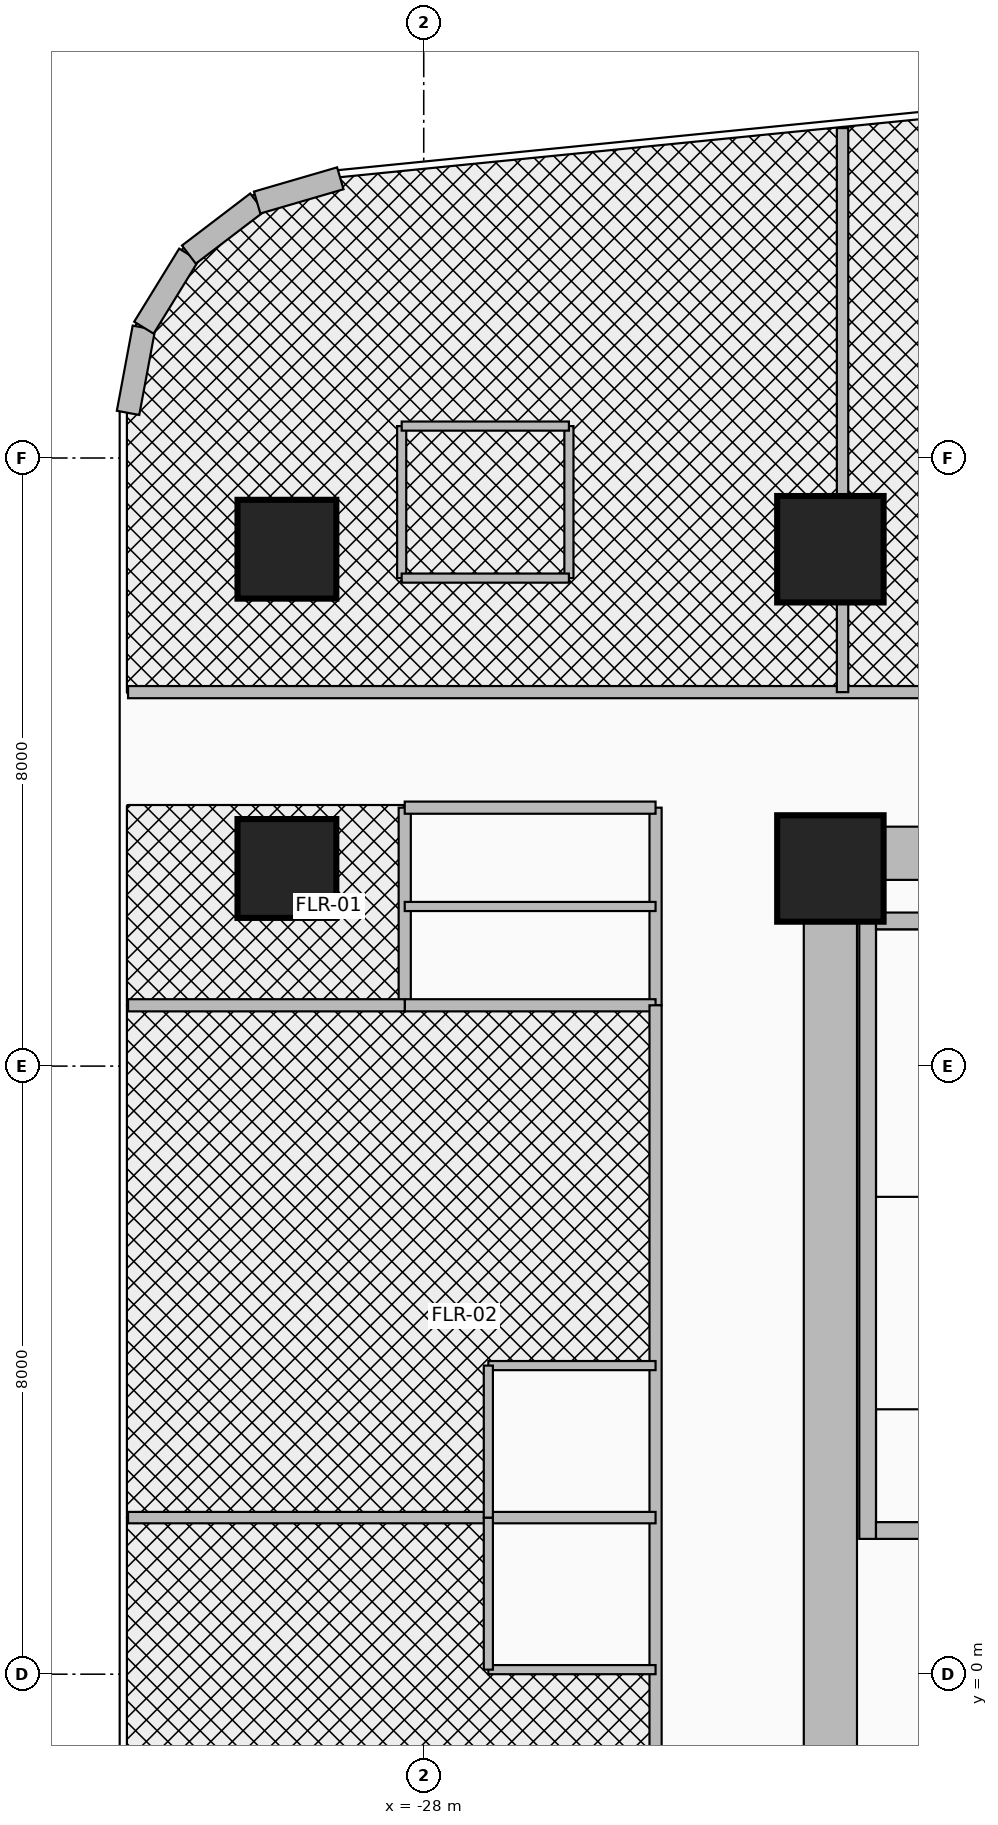
"""IFC4 building model, lengths in metres.
Left out: names, types, materials, properties, quantities, classifications, styles, units other than length and angle.
Written with IfcOpenShell. Run it as: python <this file> out.ifc"""

import sys

from ifc_helpers import new_model, si_unit, direction, frame, frame_2d, origin, origin_2d, place, context, subcontext, project, spatial, rectangle, circle, extrude, source, transform, mapped, element, fill, save


model = new_model("IFC4")
c1 = context("Model", 3, precision=1e-05, world=origin(), true_north=direction((0.0, 1.0)))
c2 = subcontext(c1, "Body", "Model", "MODEL_VIEW")
j1 = project(units=[si_unit("LENGTHUNIT", "METRE"), si_unit("PLANEANGLEUNIT", "RADIAN")], contexts=[c1])
p1 = place(None, origin())
s1 = spatial("IfcSite", under=j1, at=p1, CompositionType="ELEMENT")
p2 = place(p1, origin())
s2 = spatial("IfcBuilding", under=s1, at=p2, CompositionType="ELEMENT")
p3 = place(p2, frame((0.0, 0.0, 26.0)))
s3 = spatial("IfcBuildingStorey", under=s2, at=p3, CompositionType="ELEMENT", Elevation=26.0)
p4 = place(p3, frame((-22.16, 1.78, 0.0), z_axis=(0.0, 0.0, 1.0), x_axis=(0.0, 1.0, 0.0)))
e1 = element("IfcWall", 1, at=p4, inside=s3, PredefinedType="SHEAR", context=c2, shape_type="SweptSolid", body=[
    extrude(rectangle(XDim=8.67, YDim=0.22, at=frame_2d((4.335, 0.0))), origin(), (0.0, 0.0, 1.0), 3.46),
])
p5 = place(p3, frame((-22.05, 1.89, 0.0), z_axis=(0.0, 0.0, 1.0), x_axis=(1.0, 0.0, 0.0)))
e2 = element("IfcWall", 2, at=p5, inside=s3, PredefinedType="SHEAR", context=c2, shape_type="SweptSolid", body=[
    extrude(rectangle(XDim=3.11, YDim=0.22, at=frame_2d((1.555, 0.0))), origin(), (0.0, 0.0, 1.0), 3.46),
])
p6 = place(p5, frame((1.0, 0.0, 0.0)))
e3 = element("IfcOpeningElement", 3, at=p6, cuts=e2, PredefinedType="OPENING", context=c2, shape_type="SweptSolid", body=[
    extrude(rectangle(XDim=1.1, YDim=2.15, at=frame_2d((0.55, 1.075))), frame((0.0, 0.125, 0.0), z_axis=(0.0, -1.0, 0.0), x_axis=(1.0, 0.0, 0.0)), (0.0, 0.0, 1.0), 0.25),
])
p7 = place(p3, frame((-22.05, 9.91, 0.0), z_axis=(0.0, 0.0, 1.0), x_axis=(1.0, 0.0, 0.0)))
e4 = element("IfcWall", 4, at=p7, inside=s3, PredefinedType="SHEAR", context=c2, shape_type="SweptSolid", body=[
    extrude(rectangle(XDim=3.11, YDim=0.22, at=frame_2d((1.555, 0.0))), origin(), (0.0, 0.0, 1.0), 3.46),
])
p8 = place(p3, frame((-22.65, -11.15, 0.0), z_axis=(0.0, 0.0, 1.0), x_axis=(0.0, 1.0, 0.0)))
e5 = element("IfcWall", 5, at=p8, inside=s3, PredefinedType="SHEAR", context=c2, shape_type="SweptSolid", body=[
    extrude(rectangle(XDim=22.3, YDim=0.7, at=frame_2d((11.15, 0.0))), origin(), (0.0, 0.0, 1.0), 3.46),
])
p9 = place(p3, frame((-22.65, 10.8, 0.0), z_axis=(0.0, 0.0, 1.0), x_axis=(1.0, 0.0, 0.0)))
e6 = element("IfcWall", 6, at=p9, inside=s3, PredefinedType="SHEAR", context=c2, shape_type="SweptSolid", body=[
    extrude(rectangle(XDim=10.25, YDim=0.7, at=frame_2d((5.125, 0.0))), origin(), (0.0, 0.0, 1.0), 3.46),
])
m1 = source(origin(), c2, "Body", "SweptSolid", [
    extrude(circle(Radius=0.65, at=origin_2d()), origin(), (0.0, 0.0, 1.0), 3.7),
])
p10 = place(p3, frame((-29.8, 10.6, 0.0), z_axis=(0.0, 0.0, 1.0), x_axis=(1.0, 0.0, 0.0)))
e7 = element("IfcColumn", 7, at=p10, inside=s3, PredefinedType="COLUMN", context=c2, shape_type="MappedRepresentation", body=[
    mapped(m1, transform((0.0, 0.0, 0.0), x_axis=(1.0, 0.0, 0.0), y_axis=(0.0, 1.0, 0.0), z_axis=(0.0, 0.0, 1.0), scale=1.0)),
])
m2 = source(origin(), c2, "Body", "SweptSolid", [
    extrude(rectangle(XDim=1.4, YDim=1.4, at=origin_2d()), origin(), (0.0, 0.0, 1.0), 3.7),
])
p11 = place(p3, frame((-22.65, 10.6, 0.0), z_axis=(0.0, 0.0, 1.0), x_axis=(1.0, 0.0, 0.0)))
e8 = element("IfcColumn", 8, at=p11, inside=s3, PredefinedType="COLUMN", context=c2, shape_type="MappedRepresentation", body=[
    mapped(m2, transform((0.0, 0.0, 0.0), x_axis=(1.0, 0.0, 0.0), y_axis=(0.0, 1.0, 0.0), z_axis=(0.0, 0.0, 1.0), scale=1.0)),
])
p12 = place(p3, frame((-29.8, 14.8, 0.0), z_axis=(0.0, 0.0, 1.0), x_axis=(1.0, 0.0, 0.0)))
e9 = element("IfcColumn", 9, at=p12, inside=s3, PredefinedType="COLUMN", context=c2, shape_type="MappedRepresentation", body=[
    mapped(m1, transform((0.0, 0.0, 0.0), x_axis=(1.0, 0.0, 0.0), y_axis=(0.0, 1.0, 0.0), z_axis=(0.0, 0.0, 1.0), scale=1.0)),
])
p13 = place(p3, frame((-22.65, 14.8, 0.0), z_axis=(0.0, 0.0, 1.0), x_axis=(1.0, 0.0, 0.0)))
e10 = element("IfcColumn", 10, at=p13, inside=s3, PredefinedType="COLUMN", context=c2, shape_type="MappedRepresentation", body=[
    mapped(m2, transform((0.0, 0.0, 0.0), x_axis=(1.0, 0.0, 0.0), y_axis=(0.0, 1.0, 0.0), z_axis=(0.0, 0.0, 1.0), scale=1.0)),
])
p14 = place(p3, frame((-31.89, 16.594, 0.0), z_axis=(0.0, 0.0, 1.0), x_axis=(0.182748995683, 0.9831596028, 0.0)))
e11 = element("IfcWall", 11, at=p14, inside=s3, PredefinedType="SOLIDWALL", context=c2, shape_type="SweptSolid", body=[
    extrude(rectangle(XDim=1.14, YDim=0.3, at=frame_2d((0.57, 0.0))), origin(), (0.0, 0.0, 1.0), 3.46),
])
p15 = place(p3, frame((-31.682, 17.714, 0.0), z_axis=(0.0, 0.0, 1.0), x_axis=(0.524157723014, 0.8516212077, 0.0)))
e12 = element("IfcWall", 12, at=p15, inside=s3, PredefinedType="SOLIDWALL", context=c2, shape_type="SweptSolid", body=[
    extrude(rectangle(XDim=1.129, YDim=0.3, at=frame_2d((0.565, 0.0))), origin(), (0.0, 0.0, 1.0), 3.46),
])
p16 = place(p3, frame((-31.09, 18.676, 0.0), z_axis=(0.0, 0.0, 1.0), x_axis=(0.795253002434, 0.606277710393, 0.0)))
e13 = element("IfcWall", 13, at=p16, inside=s3, PredefinedType="SOLIDWALL", context=c2, shape_type="SweptSolid", body=[
    extrude(rectangle(XDim=1.129, YDim=0.3, at=frame_2d((0.564, 0.0))), origin(), (0.0, 0.0, 1.0), 3.46),
])
p17 = place(p3, frame((-30.192, 19.361, 0.0), z_axis=(0.0, 0.0, 1.0), x_axis=(0.960071941549, 0.279753225271, 0.0)))
e14 = element("IfcWall", 14, at=p17, inside=s3, PredefinedType="SOLIDWALL", context=c2, shape_type="SweptSolid", body=[
    extrude(rectangle(XDim=1.14, YDim=0.3, at=frame_2d((0.57, 0.0))), origin(), (0.0, 0.0, 1.0), 3.46),
])
p18 = place(p3, frame((-28.25, 8.8, 0.0), z_axis=(0.0, 0.0, 1.0), x_axis=(0.0, 1.0, 0.0)))
e15 = element("IfcWall", 15, at=p18, inside=s3, PredefinedType="PARTITIONING", context=c2, shape_type="SweptSolid", body=[
    extrude(rectangle(XDim=2.6, YDim=0.16, at=frame_2d((1.3, 0.0))), origin(), (0.0, 0.0, 1.0), 2.583),
])
p19 = place(p3, frame((-24.95, 8.8, 0.0), z_axis=(0.0, 0.0, 1.0), x_axis=(0.0, 1.0, 0.0)))
e16 = element("IfcWall", 16, at=p19, inside=s3, PredefinedType="PARTITIONING", context=c2, shape_type="SweptSolid", body=[
    extrude(rectangle(XDim=2.6, YDim=0.16, at=frame_2d((1.3, 0.0))), origin(), (0.0, 0.0, 1.0), 2.583),
])
p20 = place(p19, frame((0.3, 0.0, 0.0)))
e17 = element("IfcOpeningElement", 17, at=p20, cuts=e16, PredefinedType="OPENING", context=c2, shape_type="SweptSolid", body=[
    extrude(rectangle(XDim=0.85, YDim=2.1, at=frame_2d((0.425, 1.05))), frame((0.0, 0.095, 0.0), z_axis=(0.0, -1.0, 0.0), x_axis=(1.0, 0.0, 0.0)), (0.0, 0.0, 1.0), 0.19),
])
p21 = place(p19, frame((1.45, 0.0, 0.0)))
e18 = element("IfcOpeningElement", 18, at=p21, cuts=e16, PredefinedType="OPENING", context=c2, shape_type="SweptSolid", body=[
    extrude(rectangle(XDim=0.85, YDim=2.1, at=frame_2d((0.425, 1.05))), frame((0.0, 0.095, 0.0), z_axis=(0.0, -1.0, 0.0), x_axis=(1.0, 0.0, 0.0)), (0.0, 0.0, 1.0), 0.19),
])
for number, where, z_axis, x_axis in (
    (19, (-28.25, 8.8, 0.0), (0.0, 0.0, 1.0), (1.0, 0.0, 0.0)),
    (20, (-28.25, 11.4, 0.0), (0.0, 0.0, 1.0), (1.0, 0.0, 0.0)),
):
    element("IfcWall", number, at=place(p3, frame(where, z_axis=z_axis, x_axis=x_axis)), inside=s3, PredefinedType="PARTITIONING", context=c2, shape_type="SweptSolid", body=[
        extrude(rectangle(XDim=3.3, YDim=0.16, at=frame_2d((1.65, 0.0))), origin(), (0.0, 0.0, 1.0), 3.46),
    ])
p22 = place(p3, frame((-28.25, 10.1, 0.0), z_axis=(0.0, 0.0, 1.0), x_axis=(1.0, 0.0, 0.0)))
e21 = element("IfcWall", 21, at=p22, inside=s3, PredefinedType="PARTITIONING", context=c2, shape_type="SweptSolid", body=[
    extrude(rectangle(XDim=3.3, YDim=0.12, at=frame_2d((1.65, 0.0))), origin(), (0.0, 0.0, 1.0), 3.46),
])
p23 = place(p3, frame((-24.95, -11.42, 0.0), z_axis=(0.0, 0.0, 1.0), x_axis=(0.0, 1.0, 0.0)))
e22 = element("IfcWall", 22, at=p23, inside=s3, PredefinedType="PARTITIONING", context=c2, shape_type="SweptSolid", body=[
    extrude(rectangle(XDim=20.22, YDim=0.16, at=frame_2d((10.11, 0.0))), origin(), (0.0, 0.0, 1.0), 2.583),
])
p24 = place(p23, frame((1.895, 0.0, 0.0)))
e23 = element("IfcOpeningElement", 23, at=p24, cuts=e22, PredefinedType="OPENING", context=c2, shape_type="SweptSolid", body=[
    extrude(rectangle(XDim=0.95, YDim=2.15, at=frame_2d((0.475, 1.075))), frame((0.0, 0.095, 0.0), z_axis=(0.0, -1.0, 0.0), x_axis=(1.0, 0.0, 0.0)), (0.0, 0.0, 1.0), 0.19),
])
p25 = place(p23, frame((8.635, 0.0, 0.0)))
e24 = element("IfcOpeningElement", 24, at=p25, cuts=e22, PredefinedType="OPENING", context=c2, shape_type="SweptSolid", body=[
    extrude(rectangle(XDim=0.95, YDim=2.15, at=frame_2d((0.475, 1.075))), frame((0.0, 0.095, 0.0), z_axis=(0.0, -1.0, 0.0), x_axis=(1.0, 0.0, 0.0)), (0.0, 0.0, 1.0), 0.19),
])
p26 = place(p23, frame((17.375, 0.0, 0.0)))
e25 = element("IfcOpeningElement", 25, at=p26, cuts=e22, PredefinedType="OPENING", context=c2, shape_type="SweptSolid", body=[
    extrude(rectangle(XDim=0.95, YDim=2.15, at=frame_2d((0.475, 1.075))), frame((0.0, 0.095, 0.0), z_axis=(0.0, -1.0, 0.0), x_axis=(1.0, 0.0, 0.0)), (0.0, 0.0, 1.0), 0.19),
])
p27 = place(p3, frame((-31.89, 8.8, 0.0), z_axis=(0.0, 0.0, 1.0), x_axis=(1.0, 0.0, 0.0)))
e26 = element("IfcWall", 26, at=p27, inside=s3, PredefinedType="PARTITIONING", context=c2, shape_type="SweptSolid", body=[
    extrude(rectangle(XDim=3.64, YDim=0.16, at=frame_2d((1.82, 0.0))), origin(), (0.0, 0.0, 1.0), 2.896),
])
p28 = place(p27, frame((0.32, 0.0, 0.0)))
e27 = element("IfcOpeningElement", 27, at=p28, cuts=e26, PredefinedType="OPENING", context=c2, shape_type="SweptSolid", body=[
    extrude(rectangle(XDim=0.9, YDim=2.1, at=frame_2d((0.45, 1.05))), frame((0.0, 0.095, 0.0), z_axis=(0.0, -1.0, 0.0), x_axis=(1.0, 0.0, 0.0)), (0.0, 0.0, 1.0), 0.19),
])
p29 = place(p3, frame((-31.89, 2.06, 0.0), z_axis=(0.0, 0.0, 1.0), x_axis=(1.0, 0.0, 0.0)))
e28 = element("IfcWall", 28, at=p29, inside=s3, PredefinedType="PARTITIONING", context=c2, shape_type="SweptSolid", body=[
    extrude(rectangle(XDim=6.94, YDim=0.15, at=frame_2d((3.47, 0.0))), origin(), (0.0, 0.0, 1.0), 2.896),
])
p30 = place(p3, frame((-27.15, 0.06, 0.0), z_axis=(0.0, 0.0, 1.0), x_axis=(1.0, 0.0, 0.0)))
e29 = element("IfcWall", 29, at=p30, inside=s3, PredefinedType="PARTITIONING", context=c2, shape_type="SweptSolid", body=[
    extrude(rectangle(XDim=2.2, YDim=0.12, at=frame_2d((1.1, 0.0))), origin(), (0.0, 0.0, 1.0), 2.979),
])
p31 = place(p3, frame((-27.15, 0.06, 0.0), z_axis=(0.0, 0.0, 1.0), x_axis=(0.0, 1.0, 0.0)))
e30 = element("IfcWall", 30, at=p31, inside=s3, PredefinedType="PARTITIONING", context=c2, shape_type="SweptSolid", body=[
    extrude(rectangle(XDim=2.0, YDim=0.12, at=frame_2d((1.0, 0.0))), origin(), (0.0, 0.0, 1.0), 2.979),
])
p32 = place(p31, frame((0.575, 0.0, 0.0)))
e31 = element("IfcOpeningElement", 31, at=p32, cuts=e30, PredefinedType="OPENING", context=c2, shape_type="SweptSolid", body=[
    extrude(rectangle(XDim=0.85, YDim=2.1, at=frame_2d((0.425, 1.05))), frame((0.0, 0.075, 0.0), z_axis=(0.0, -1.0, 0.0), x_axis=(1.0, 0.0, 0.0)), (0.0, 0.0, 1.0), 0.15),
])
p33 = place(p3, frame((-27.15, 4.06, 0.0), z_axis=(0.0, 0.0, 1.0), x_axis=(1.0, 0.0, 0.0)))
e32 = element("IfcWall", 32, at=p33, inside=s3, PredefinedType="PARTITIONING", context=c2, shape_type="SweptSolid", body=[
    extrude(rectangle(XDim=2.2, YDim=0.12, at=frame_2d((1.1, 0.0))), origin(), (0.0, 0.0, 1.0), 3.46),
])
p34 = place(p3, frame((-27.15, 2.06, 0.0), z_axis=(0.0, 0.0, 1.0), x_axis=(0.0, 1.0, 0.0)))
e33 = element("IfcWall", 33, at=p34, inside=s3, PredefinedType="PARTITIONING", context=c2, shape_type="SweptSolid", body=[
    extrude(rectangle(XDim=2.0, YDim=0.12, at=frame_2d((1.0, 0.0))), origin(), (0.0, 0.0, 1.0), 2.979),
])
p35 = place(p34, frame((0.575, 0.0, 0.0)))
e34 = element("IfcOpeningElement", 34, at=p35, cuts=e33, PredefinedType="OPENING", context=c2, shape_type="SweptSolid", body=[
    extrude(rectangle(XDim=0.85, YDim=2.1, at=frame_2d((0.425, 1.05))), frame((0.0, 0.075, 0.0), z_axis=(0.0, -1.0, 0.0), x_axis=(1.0, 0.0, 0.0)), (0.0, 0.0, 1.0), 0.15),
])
p36 = place(p3, frame((-31.89, 12.92, 0.0), z_axis=(0.0, 0.0, 1.0), x_axis=(1.0, 0.0, 0.0)))
e35 = element("IfcWall", 35, at=p36, inside=s3, PredefinedType="PARTITIONING", context=c2, shape_type="SweptSolid", body=[
    extrude(rectangle(XDim=45.44, YDim=0.16, at=frame_2d((22.72, 0.0))), origin(), (0.0, 0.0, 1.0), 2.583),
])
p37 = place(p36, frame((4.225, 0.0, 0.0)))
e36 = element("IfcOpeningElement", 36, at=p37, cuts=e35, PredefinedType="OPENING", context=c2, shape_type="SweptSolid", body=[
    extrude(rectangle(XDim=0.95, YDim=2.15, at=frame_2d((0.475, 1.075))), frame((0.0, 0.095, 0.0), z_axis=(0.0, -1.0, 0.0), x_axis=(1.0, 0.0, 0.0)), (0.0, 0.0, 1.0), 0.19),
])
p38 = place(p36, frame((13.43, 0.0, 0.0)))
e37 = element("IfcOpeningElement", 37, at=p38, cuts=e35, PredefinedType="OPENING", context=c2, shape_type="SweptSolid", body=[
    extrude(rectangle(XDim=0.95, YDim=2.15, at=frame_2d((0.475, 1.075))), frame((0.0, 0.095, 0.0), z_axis=(0.0, -1.0, 0.0), x_axis=(1.0, 0.0, 0.0)), (0.0, 0.0, 1.0), 0.19),
])
p39 = place(p36, frame((20.31, 0.0, 0.0)))
e38 = element("IfcOpeningElement", 38, at=p39, cuts=e35, PredefinedType="OPENING", context=c2, shape_type="SweptSolid", body=[
    extrude(rectangle(XDim=0.95, YDim=2.15, at=frame_2d((0.475, 1.075))), frame((0.0, 0.095, 0.0), z_axis=(0.0, -1.0, 0.0), x_axis=(1.0, 0.0, 0.0)), (0.0, 0.0, 1.0), 0.19),
])
p40 = place(p36, frame((25.517, 0.0, 0.0)))
e39 = element("IfcOpeningElement", 39, at=p40, cuts=e35, PredefinedType="OPENING", context=c2, shape_type="SweptSolid", body=[
    extrude(rectangle(XDim=0.95, YDim=2.15, at=frame_2d((0.475, 1.075))), frame((0.0, 0.095, 0.0), z_axis=(0.0, -1.0, 0.0), x_axis=(1.0, 0.0, 0.0)), (0.0, 0.0, 1.0), 0.19),
])
p41 = place(p36, frame((28.373, 0.0, 0.0)))
e40 = element("IfcOpeningElement", 40, at=p41, cuts=e35, PredefinedType="OPENING", context=c2, shape_type="SweptSolid", body=[
    extrude(rectangle(XDim=0.95, YDim=2.15, at=frame_2d((0.475, 1.075))), frame((0.0, 0.095, 0.0), z_axis=(0.0, -1.0, 0.0), x_axis=(1.0, 0.0, 0.0)), (0.0, 0.0, 1.0), 0.19),
])
p42 = place(p36, frame((34.527, 0.0, 0.0)))
e41 = element("IfcOpeningElement", 41, at=p42, cuts=e35, PredefinedType="OPENING", context=c2, shape_type="SweptSolid", body=[
    extrude(rectangle(XDim=0.95, YDim=2.15, at=frame_2d((0.475, 1.075))), frame((0.0, 0.095, 0.0), z_axis=(0.0, -1.0, 0.0), x_axis=(1.0, 0.0, 0.0)), (0.0, 0.0, 1.0), 0.19),
])
p43 = place(p36, frame((39.36, 0.0, 0.0)))
e42 = element("IfcOpeningElement", 42, at=p43, cuts=e35, PredefinedType="OPENING", context=c2, shape_type="SweptSolid", body=[
    extrude(rectangle(XDim=0.95, YDim=2.15, at=frame_2d((0.475, 1.075))), frame((0.0, 0.095, 0.0), z_axis=(0.0, -1.0, 0.0), x_axis=(1.0, 0.0, 0.0)), (0.0, 0.0, 1.0), 0.19),
])
p44 = place(p3, frame((-22.49, 12.92, 0.0), z_axis=(0.0, 0.0, 1.0), x_axis=(0.0, 1.0, 0.0)))
e43 = element("IfcWall", 43, at=p44, inside=s3, PredefinedType="PARTITIONING", context=c2, shape_type="SweptSolid", body=[
    extrude(rectangle(XDim=7.421, YDim=0.15, at=frame_2d((3.71, 0.0))), origin(), (0.0, 0.0, 1.0), 2.583),
])
for number, where, z_axis, x_axis in (
    (44, (-28.29, 14.42, 0.0), (0.0, 0.0, 1.0), (0.0, 1.0, 0.0)),
    (45, (-26.09, 14.42, 0.0), (0.0, 0.0, 1.0), (0.0, 1.0, 0.0)),
):
    element("IfcWall", number, at=place(p3, frame(where, z_axis=z_axis, x_axis=x_axis)), inside=s3, PredefinedType="PARTITIONING", context=c2, shape_type="SweptSolid", body=[
        extrude(rectangle(XDim=2.0, YDim=0.12, at=frame_2d((1.0, 0.0))), origin(), (0.0, 0.0, 1.0), 2.583),
    ])
p45 = place(p3, frame((-28.29, 16.42, 0.0), z_axis=(0.0, 0.0, 1.0), x_axis=(1.0, 0.0, 0.0)))
e46 = element("IfcWall", 46, at=p45, inside=s3, PredefinedType="PARTITIONING", context=c2, shape_type="SweptSolid", body=[
    extrude(rectangle(XDim=2.2, YDim=0.12, at=frame_2d((1.1, 0.0))), origin(), (0.0, 0.0, 1.0), 3.46),
])
p46 = place(p3, frame((-28.29, 14.42, 0.0), z_axis=(0.0, 0.0, 1.0), x_axis=(1.0, 0.0, 0.0)))
e47 = element("IfcWall", 47, at=p46, inside=s3, PredefinedType="PARTITIONING", context=c2, shape_type="SweptSolid", body=[
    extrude(rectangle(XDim=2.2, YDim=0.12, at=frame_2d((1.1, 0.0))), origin(), (0.0, 0.0, 1.0), 3.46),
])
p47 = place(p46, frame((0.675, 0.0, 0.0)))
e48 = element("IfcOpeningElement", 48, at=p47, cuts=e47, PredefinedType="OPENING", context=c2, shape_type="SweptSolid", body=[
    extrude(rectangle(XDim=0.85, YDim=2.1, at=frame_2d((0.425, 1.05))), frame((0.0, 0.075, 0.0), z_axis=(0.0, -1.0, 0.0), x_axis=(1.0, 0.0, 0.0)), (0.0, 0.0, 1.0), 0.15),
])
p48 = place(p20, origin())
e49 = element("IfcDoor", 49, at=p48, inside=s3, OperationType="SINGLE_SWING_RIGHT", PredefinedType="DOOR", context=c2, shape_type="SweptSolid", body=[
    extrude(rectangle(XDim=0.85, YDim=2.1, at=frame_2d((0.425, 1.05))), frame((0.0, 0.025, 0.0), z_axis=(0.0, -1.0, 0.0), x_axis=(1.0, 0.0, 0.0)), (0.0, 0.0, 1.0), 0.05),
])
fill(e17, e49)
p49 = place(p21, origin())
e50 = element("IfcDoor", 50, at=p49, inside=s3, OperationType="SINGLE_SWING_LEFT", PredefinedType="DOOR", context=c2, shape_type="SweptSolid", body=[
    extrude(rectangle(XDim=0.85, YDim=2.1, at=frame_2d((0.425, 1.05))), frame((0.0, 0.025, 0.0), z_axis=(0.0, -1.0, 0.0), x_axis=(1.0, 0.0, 0.0)), (0.0, 0.0, 1.0), 0.05),
])
fill(e18, e50)
p50 = place(p28, origin())
e51 = element("IfcDoor", 51, at=p50, inside=s3, OperationType="SINGLE_SWING_RIGHT", PredefinedType="DOOR", context=c2, shape_type="SweptSolid", body=[
    extrude(rectangle(XDim=0.9, YDim=2.1, at=frame_2d((0.45, 1.05))), frame((0.0, 0.025, 0.0), z_axis=(0.0, -1.0, 0.0), x_axis=(1.0, 0.0, 0.0)), (0.0, 0.0, 1.0), 0.05),
])
fill(e27, e51)
p51 = place(p32, origin())
e52 = element("IfcDoor", 52, at=p51, inside=s3, OperationType="SINGLE_SWING_RIGHT", PredefinedType="DOOR", context=c2, shape_type="SweptSolid", body=[
    extrude(rectangle(XDim=0.85, YDim=2.1, at=frame_2d((0.425, 1.05))), frame((0.0, 0.025, 0.0), z_axis=(0.0, -1.0, 0.0), x_axis=(1.0, 0.0, 0.0)), (0.0, 0.0, 1.0), 0.05),
])
fill(e31, e52)
p52 = place(p26, frame((0.95, 0.0, 0.0), z_axis=(0.0, 0.0, 1.0), x_axis=(-1.0, 0.0, 0.0)))
e53 = element("IfcDoor", 53, at=p52, inside=s3, OperationType="SINGLE_SWING_LEFT", PredefinedType="DOOR", context=c2, shape_type="SweptSolid", body=[
    extrude(rectangle(XDim=0.95, YDim=2.15, at=frame_2d((0.475, 1.075))), frame((0.0, 0.025, 0.0), z_axis=(0.0, -1.0, 0.0), x_axis=(1.0, 0.0, 0.0)), (0.0, 0.0, 1.0), 0.05),
])
fill(e25, e53)
p53 = place(p35, origin())
e54 = element("IfcDoor", 54, at=p53, inside=s3, OperationType="SINGLE_SWING_RIGHT", PredefinedType="DOOR", context=c2, shape_type="SweptSolid", body=[
    extrude(rectangle(XDim=0.85, YDim=2.1, at=frame_2d((0.425, 1.05))), frame((0.0, 0.025, 0.0), z_axis=(0.0, -1.0, 0.0), x_axis=(1.0, 0.0, 0.0)), (0.0, 0.0, 1.0), 0.05),
])
fill(e34, e54)
p54 = place(p37, frame((0.95, 0.0, 0.0), z_axis=(0.0, 0.0, 1.0), x_axis=(-1.0, 0.0, 0.0)))
e55 = element("IfcDoor", 55, at=p54, inside=s3, OperationType="SINGLE_SWING_LEFT", PredefinedType="DOOR", context=c2, shape_type="SweptSolid", body=[
    extrude(rectangle(XDim=0.95, YDim=2.15, at=frame_2d((0.475, 1.075))), frame((0.0, 0.025, 0.0), z_axis=(0.0, -1.0, 0.0), x_axis=(1.0, 0.0, 0.0)), (0.0, 0.0, 1.0), 0.05),
])
fill(e36, e55)
p55 = place(p47, origin())
e56 = element("IfcDoor", 56, at=p55, inside=s3, OperationType="SINGLE_SWING_RIGHT", PredefinedType="DOOR", context=c2, shape_type="SweptSolid", body=[
    extrude(rectangle(XDim=0.85, YDim=2.1, at=frame_2d((0.425, 1.05))), frame((0.0, 0.025, 0.0), z_axis=(0.0, -1.0, 0.0), x_axis=(1.0, 0.0, 0.0)), (0.0, 0.0, 1.0), 0.05),
])
fill(e48, e56)
save(model, sys.argv[1])
